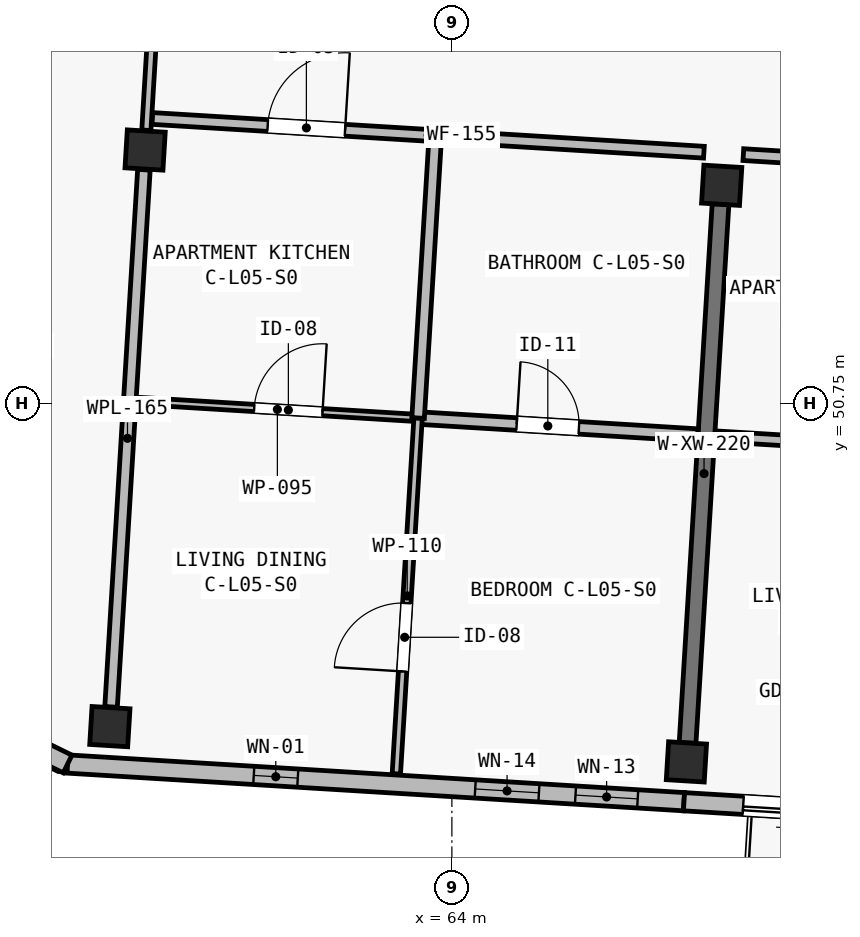
"""IFC4 building model, lengths in metres.
Left out: names, types, materials, properties, quantities, classifications, styles, units other than length and angle.
Written with IfcOpenShell. Run it as: python <this file> out.ifc"""

import sys

from ifc_helpers import new_model, si_unit, direction, frame, frame_2d, origin, origin_2d, place, context, subcontext, project, spatial, rectangle, extrude, element, fill, save


model = new_model("IFC4")
c1 = context("Model", 3, precision=1e-05, world=origin(), true_north=direction((0.0, 1.0)))
c2 = subcontext(c1, "Body", "Model", "MODEL_VIEW")
j1 = project(units=[si_unit("LENGTHUNIT", "METRE"), si_unit("PLANEANGLEUNIT", "RADIAN")], contexts=[c1])
p1 = place(None, origin())
s1 = spatial("IfcSite", under=j1, at=p1, CompositionType="ELEMENT")
p2 = place(p1, origin())
s2 = spatial("IfcBuilding", under=s1, at=p2, CompositionType="ELEMENT")
p3 = place(p2, frame((0.0, 0.0, 18.15)))
s3 = spatial("IfcBuildingStorey", under=s2, at=p3, CompositionType="ELEMENT", Elevation=18.15)
for number, where, z_axis, x_axis in (
    (1, (59.5, 46.5, 0.0), (0.0, 0.0, 1.0), (0.998, -0.061, 0.0)),
    (2, (59.964, 54.086, 0.0), (0.0, 0.0, 1.0), (0.998, -0.061, 0.0)),
    (3, (67.086, 46.036, 0.0), (0.0, 0.0, 1.0), (0.998, -0.061, 0.0)),
    (4, (67.55, 53.622, 0.0), (0.0, 0.0, 1.0), (0.998, -0.061, 0.0)),
):
    element("IfcColumn", number, at=place(p3, frame(where, z_axis=z_axis, x_axis=x_axis)), inside=s3, PredefinedType="COLUMN", context=c2, shape_type="SweptSolid", body=[
        extrude(rectangle(XDim=0.5, YDim=0.5, at=origin_2d()), origin(), (0.0, 0.0, 1.0), 3.25),
    ])
p4 = place(p3, frame((67.101, 46.286, 0.0), z_axis=(0.0, 0.0, 1.0), x_axis=(0.061035953884, 0.998135568114, 0.0)))
e5 = element("IfcWall", 5, at=p4, inside=s3, PredefinedType="SHEAR", context=c2, shape_type="SweptSolid", body=[
    extrude(rectangle(XDim=7.1, YDim=0.22, at=frame_2d((3.55, 0.0))), origin(), (0.0, 0.0, 1.0), 2.5),
])
p5 = place(p3, frame((67.054, 45.512, 0.0), z_axis=(0.0, 0.0, 1.0), x_axis=(-0.998134248939, 0.061057522844, 0.0)))
e6 = element("IfcWall", 6, at=p5, inside=s3, PredefinedType="SOLIDWALL", context=c2, shape_type="SweptSolid", body=[
    extrude(rectangle(XDim=8.125, YDim=0.24, at=frame_2d((4.062, 0.0))), origin(), (0.0, 0.0, 1.0), 3.0),
])
p6 = place(p5, frame((0.61, 0.0, 0.52)))
e7 = element("IfcOpeningElement", 7, at=p6, cuts=e6, PredefinedType="OPENING", context=c2, shape_type="SweptSolid", body=[
    extrude(rectangle(XDim=0.82, YDim=2.18, at=frame_2d((0.41, 1.09))), frame((0.0, 0.135, 0.0), z_axis=(0.0, -1.0, 0.0), x_axis=(1.0, 0.0, 0.0)), (0.0, 0.0, 1.0), 0.27),
])
p7 = place(p5, frame((1.912, 0.0, 0.42)))
e8 = element("IfcOpeningElement", 8, at=p7, cuts=e6, PredefinedType="OPENING", context=c2, shape_type="SweptSolid", body=[
    extrude(rectangle(XDim=0.84, YDim=2.28, at=frame_2d((0.42, 1.14))), frame((0.0, 0.135, 0.0), z_axis=(0.0, -1.0, 0.0), x_axis=(1.0, 0.0, 0.0)), (0.0, 0.0, 1.0), 0.27),
])
p8 = place(p5, frame((5.091, 0.0, 0.52)))
e9 = element("IfcOpeningElement", 9, at=p8, cuts=e6, PredefinedType="OPENING", context=c2, shape_type="SweptSolid", body=[
    extrude(rectangle(XDim=0.58, YDim=2.16, at=frame_2d((0.29, 1.08))), frame((0.0, 0.135, 0.0), z_axis=(0.0, -1.0, 0.0), x_axis=(1.0, 0.0, 0.0)), (0.0, 0.0, 1.0), 0.27),
])
p9 = place(p3, frame((74.64, 45.048, 0.0), z_axis=(0.0, 0.0, 1.0), x_axis=(-0.998135669243, 0.061034300063, 0.0)))
e10 = element("IfcWall", 10, at=p9, inside=s3, PredefinedType="SOLIDWALL", context=c2, shape_type="SweptSolid", body=[
    extrude(rectangle(XDim=7.6, YDim=0.24, at=frame_2d((3.8, 0.0))), origin(), (0.0, 0.0, 1.0), 3.0),
])
p10 = place(p9, frame((5.019, 0.0, 0.0)))
e11 = element("IfcOpeningElement", 11, at=p10, cuts=e10, PredefinedType="OPENING", context=c2, shape_type="SweptSolid", body=[
    extrude(rectangle(XDim=1.8, YDim=2.12, at=frame_2d((0.9, 1.06))), frame((0.0, 0.135, 0.0), z_axis=(0.0, -1.0, 0.0), x_axis=(1.0, 0.0, 0.0)), (0.0, 0.0, 1.0), 0.27),
])
p11 = place(p9, frame((0.73, 0.0, 0.42)))
e12 = element("IfcOpeningElement", 12, at=p11, cuts=e10, PredefinedType="OPENING", context=c2, shape_type="SweptSolid", body=[
    extrude(rectangle(XDim=0.68, YDim=2.24, at=frame_2d((0.34, 1.12))), frame((0.0, 0.135, 0.0), z_axis=(0.0, -1.0, 0.0), x_axis=(1.0, 0.0, 0.0)), (0.0, 0.0, 1.0), 0.27),
])
p12 = place(p3, frame((58.944, 46.008, 0.0), z_axis=(0.0, 0.0, 1.0), x_axis=(-0.897775054318, 0.440454256246, 0.0)))
e13 = element("IfcWall", 13, at=p12, inside=s3, PredefinedType="SOLIDWALL", context=c2, shape_type="SweptSolid", body=[
    extrude(rectangle(XDim=8.12, YDim=0.26, at=frame_2d((4.06, 0.0))), origin(), (0.0, 0.0, 1.0), 3.0),
])
p13 = place(p12, frame((2.63, 0.0, 0.52)))
e14 = element("IfcOpeningElement", 14, at=p13, cuts=e13, PredefinedType="OPENING", context=c2, shape_type="SweptSolid", body=[
    extrude(rectangle(XDim=0.82, YDim=2.18, at=frame_2d((0.41, 1.09))), frame((0.0, 0.145, 0.0), z_axis=(0.0, -1.0, 0.0), x_axis=(1.0, 0.0, 0.0)), (0.0, 0.0, 1.0), 0.29),
])
p14 = place(p12, frame((4.47, 0.0, 0.45)))
e15 = element("IfcOpeningElement", 15, at=p14, cuts=e13, PredefinedType="OPENING", context=c2, shape_type="SweptSolid", body=[
    extrude(rectangle(XDim=0.66, YDim=2.32, at=frame_2d((0.33, 1.16))), frame((0.0, 0.145, 0.0), z_axis=(0.0, -1.0, 0.0), x_axis=(1.0, 0.0, 0.0)), (0.0, 0.0, 1.0), 0.29),
])
p15 = place(p3, frame((51.654, 49.585, 0.0), z_axis=(0.0, 0.0, 1.0), x_axis=(0.448621989068, 0.893721607059, 0.0)))
e16 = element("IfcWall", 16, at=p15, inside=s3, PredefinedType="SOLIDWALL", context=c2, shape_type="SweptSolid", body=[
    extrude(rectangle(XDim=19.061, YDim=0.26, at=frame_2d((9.53, 0.0))), origin(), (0.0, 0.0, 1.0), 3.0),
])
p16 = place(p15, frame((2.63, 0.0, 0.52)))
e17 = element("IfcOpeningElement", 17, at=p16, cuts=e16, PredefinedType="OPENING", context=c2, shape_type="SweptSolid", body=[
    extrude(rectangle(XDim=0.82, YDim=2.18, at=frame_2d((0.41, 1.09))), frame((0.0, 0.145, 0.0), z_axis=(0.0, -1.0, 0.0), x_axis=(1.0, 0.0, 0.0)), (0.0, 0.0, 1.0), 0.29),
])
p17 = place(p15, frame((15.41, 0.0, 0.45)))
e18 = element("IfcOpeningElement", 18, at=p17, cuts=e16, PredefinedType="OPENING", context=c2, shape_type="SweptSolid", body=[
    extrude(rectangle(XDim=0.66, YDim=2.32, at=frame_2d((0.33, 1.16))), frame((0.0, 0.145, 0.0), z_axis=(0.0, -1.0, 0.0), x_axis=(1.0, 0.0, 0.0)), (0.0, 0.0, 1.0), 0.29),
])
p18 = place(p3, frame((59.98, 54.345, 0.0), z_axis=(0.0, 0.0, 1.0), x_axis=(0.061101107425, 0.998131581843, 0.0)))
e19 = element("IfcWall", 19, at=p18, inside=s3, PredefinedType="PARTITIONING", context=c2, shape_type="SweptSolid", body=[
    extrude(rectangle(XDim=3.88, YDim=0.12, at=frame_2d((1.94, 0.0))), origin(), (0.0, 0.0, 1.0), 2.5),
])
p19 = place(p18, frame((1.35, 0.0, 0.0)))
e20 = element("IfcOpeningElement", 20, at=p19, cuts=e19, PredefinedType="OPENING", context=c2, shape_type="SweptSolid", body=[
    extrude(rectangle(XDim=0.9, YDim=2.1, at=frame_2d((0.45, 1.05))), frame((0.0, 0.075, 0.0), z_axis=(0.0, -1.0, 0.0), x_axis=(1.0, 0.0, 0.0)), (0.0, 0.0, 1.0), 0.15),
])
p20 = place(p3, frame((59.516, 46.76, 0.0), z_axis=(0.0, 0.0, 1.0), x_axis=(0.061034344288, 0.998135666539, 0.0)))
e21 = element("IfcWall", 21, at=p20, inside=s3, PredefinedType="PLUMBINGWALL", context=c2, shape_type="SweptSolid", body=[
    extrude(rectangle(XDim=7.08, YDim=0.165, at=frame_2d((3.54, 0.0))), origin(), (0.0, 0.0, 1.0), 2.5),
])
p21 = place(p3, frame((60.06, 54.501, 0.0), z_axis=(0.0, 0.0, 1.0), x_axis=(0.998134543433, -0.06105270843, 0.0)))
e22 = element("IfcWall", 22, at=p21, inside=s3, PredefinedType="PARTITIONING", context=c2, shape_type="SweptSolid", body=[
    extrude(rectangle(XDim=7.27, YDim=0.155, at=frame_2d((3.635, 0.0))), origin(), (0.0, 0.0, 1.0), 2.97),
])
p22 = place(p21, frame((1.52, 0.0, 0.0)))
e23 = element("IfcOpeningElement", 23, at=p22, cuts=e22, PredefinedType="OPENING", context=c2, shape_type="SweptSolid", body=[
    extrude(rectangle(XDim=1.02, YDim=2.2, at=frame_2d((0.51, 1.1))), frame((0.0, 0.093, 0.0), z_axis=(0.0, -1.0, 0.0), x_axis=(1.0, 0.0, 0.0)), (0.0, 0.0, 1.0), 0.185),
])
p23 = place(p3, frame((59.852, 50.786, 0.0), z_axis=(0.0, 0.0, 1.0), x_axis=(0.998137662841, -0.061001688651, 0.0)))
e24 = element("IfcWall", 24, at=p23, inside=s3, PredefinedType="PARTITIONING", context=c2, shape_type="SweptSolid", body=[
    extrude(rectangle(XDim=3.71, YDim=0.095, at=frame_2d((1.855, 0.0))), origin(), (0.0, 0.0, 1.0), 2.97),
])
p24 = place(p23, frame((1.55, 0.0, 0.0)))
e25 = element("IfcOpeningElement", 25, at=p24, cuts=e24, PredefinedType="OPENING", context=c2, shape_type="SweptSolid", body=[
    extrude(rectangle(XDim=0.9, YDim=2.1, at=frame_2d((0.45, 1.05))), frame((0.0, 0.062, 0.0), z_axis=(0.0, -1.0, 0.0), x_axis=(1.0, 0.0, 0.0)), (0.0, 0.0, 1.0), 0.125),
])
p25 = place(p3, frame((63.555, 50.56, 0.0), z_axis=(0.0, 0.0, 1.0), x_axis=(0.998132682596, -0.061083123148, 0.0)))
e26 = element("IfcWall", 26, at=p25, inside=s3, PredefinedType="PLUMBINGWALL", context=c2, shape_type="SweptSolid", body=[
    extrude(rectangle(XDim=3.685, YDim=0.165, at=frame_2d((1.843, 0.0))), origin(), (0.0, 0.0, 1.0), 2.97),
])
p26 = place(p25, frame((1.3, 0.0, 0.0)))
e27 = element("IfcOpeningElement", 27, at=p26, cuts=e26, PredefinedType="OPENING", context=c2, shape_type="SweptSolid", body=[
    extrude(rectangle(XDim=0.82, YDim=2.08, at=frame_2d((0.41, 1.04))), frame((0.0, 0.097, 0.0), z_axis=(0.0, -1.0, 0.0), x_axis=(1.0, 0.0, 0.0)), (0.0, 0.0, 1.0), 0.195),
])
p27 = place(p3, frame((63.269, 45.879, 0.0), z_axis=(0.0, 0.0, 1.0), x_axis=(0.061059262019, 0.998134142549, 0.0)))
e28 = element("IfcWall", 28, at=p27, inside=s3, PredefinedType="PARTITIONING", context=c2, shape_type="SweptSolid", body=[
    extrude(rectangle(XDim=4.69, YDim=0.11, at=frame_2d((2.345, 0.0))), origin(), (0.0, 0.0, 1.0), 2.97),
])
p28 = place(p27, frame((1.35, 0.0, 0.0)))
e29 = element("IfcOpeningElement", 29, at=p28, cuts=e28, PredefinedType="OPENING", context=c2, shape_type="SweptSolid", body=[
    extrude(rectangle(XDim=0.9, YDim=2.1, at=frame_2d((0.45, 1.05))), frame((0.0, 0.07, 0.0), z_axis=(0.0, -1.0, 0.0), x_axis=(1.0, 0.0, 0.0)), (0.0, 0.0, 1.0), 0.14),
])
p29 = place(p3, frame((63.555, 50.56, 0.0), z_axis=(0.0, 0.0, 1.0), x_axis=(0.061038003798, 0.998135442759, 0.0)))
e30 = element("IfcWall", 30, at=p29, inside=s3, PredefinedType="PLUMBINGWALL", context=c2, shape_type="SweptSolid", body=[
    extrude(rectangle(XDim=3.72, YDim=0.165, at=frame_2d((1.86, 0.0))), origin(), (0.0, 0.0, 1.0), 2.97),
])
p30 = place(p3, frame((67.835, 54.025, 0.0), z_axis=(0.0, 0.0, 1.0), x_axis=(0.998135666539, -0.061034344288, 0.0)))
e31 = element("IfcWall", 31, at=p30, inside=s3, PredefinedType="PARTITIONING", context=c2, shape_type="SweptSolid", body=[
    extrude(rectangle(XDim=7.08, YDim=0.155, at=frame_2d((3.54, 0.0))), origin(), (0.0, 0.0, 1.0), 2.97),
])
p31 = place(p30, frame((1.33, 0.0, 0.0)))
e32 = element("IfcOpeningElement", 32, at=p31, cuts=e31, PredefinedType="OPENING", context=c2, shape_type="SweptSolid", body=[
    extrude(rectangle(XDim=0.98, YDim=2.15, at=frame_2d((0.49, 1.075))), frame((0.0, 0.093, 0.0), z_axis=(0.0, -1.0, 0.0), x_axis=(1.0, 0.0, 0.0)), (0.0, 0.0, 1.0), 0.185),
])
p32 = place(p3, frame((67.463, 50.321, 0.0), z_axis=(0.0, 0.0, 1.0), x_axis=(0.998132682596, -0.061083123148, 0.0)))
e33 = element("IfcWall", 33, at=p32, inside=s3, PredefinedType="PARTITIONING", context=c2, shape_type="SweptSolid", body=[
    extrude(rectangle(XDim=3.685, YDim=0.14, at=frame_2d((1.843, 0.0))), origin(), (0.0, 0.0, 1.0), 2.97),
])
p33 = place(p32, frame((1.525, 0.0, 0.0)))
e34 = element("IfcOpeningElement", 34, at=p33, cuts=e33, PredefinedType="OPENING", context=c2, shape_type="SweptSolid", body=[
    extrude(rectangle(XDim=0.9, YDim=2.1, at=frame_2d((0.45, 1.05))), frame((0.0, 0.085, 0.0), z_axis=(0.0, -1.0, 0.0), x_axis=(1.0, 0.0, 0.0)), (0.0, 0.0, 1.0), 0.17),
])
p34 = place(p6, origin())
e35 = element("IfcWindow", 35, at=p34, inside=s3, PartitioningType="SINGLE_PANEL", PredefinedType="WINDOW", context=c2, shape_type="SweptSolid", body=[
    extrude(rectangle(XDim=0.82, YDim=2.18, at=frame_2d((0.41, 1.09))), frame((0.0, 0.03, 0.0), z_axis=(0.0, -1.0, 0.0), x_axis=(1.0, 0.0, 0.0)), (0.0, 0.0, 1.0), 0.06),
])
fill(e7, e35)
p35 = place(p7, origin())
e36 = element("IfcWindow", 36, at=p35, inside=s3, PartitioningType="SINGLE_PANEL", PredefinedType="WINDOW", context=c2, shape_type="SweptSolid", body=[
    extrude(rectangle(XDim=0.84, YDim=2.28, at=frame_2d((0.42, 1.14))), frame((0.0, 0.03, 0.0), z_axis=(0.0, -1.0, 0.0), x_axis=(1.0, 0.0, 0.0)), (0.0, 0.0, 1.0), 0.06),
])
fill(e8, e36)
p36 = place(p8, origin())
e37 = element("IfcWindow", 37, at=p36, inside=s3, PartitioningType="SINGLE_PANEL", PredefinedType="WINDOW", context=c2, shape_type="SweptSolid", body=[
    extrude(rectangle(XDim=0.58, YDim=2.16, at=frame_2d((0.29, 1.08))), frame((0.0, 0.03, 0.0), z_axis=(0.0, -1.0, 0.0), x_axis=(1.0, 0.0, 0.0)), (0.0, 0.0, 1.0), 0.06),
])
fill(e9, e37)
p37 = place(p10, origin())
e38 = element("IfcDoor", 38, at=p37, inside=s3, OperationType="SLIDING_TO_LEFT", PredefinedType="DOOR", context=c2, shape_type="SweptSolid", body=[
    extrude(rectangle(XDim=1.8, YDim=2.12, at=frame_2d((0.9, 1.06))), frame((0.0, 0.025, 0.0), z_axis=(0.0, -1.0, 0.0), x_axis=(1.0, 0.0, 0.0)), (0.0, 0.0, 1.0), 0.05),
])
fill(e11, e38)
p38 = place(p22, origin())
e39 = element("IfcDoor", 39, at=p38, inside=s3, OperationType="SINGLE_SWING_RIGHT", PredefinedType="DOOR", context=c2, shape_type="SweptSolid", body=[
    extrude(rectangle(XDim=1.02, YDim=2.2, at=frame_2d((0.51, 1.1))), frame((0.0, 0.025, 0.0), z_axis=(0.0, -1.0, 0.0), x_axis=(1.0, 0.0, 0.0)), (0.0, 0.0, 1.0), 0.05),
])
fill(e23, e39)
p39 = place(p24, origin())
e40 = element("IfcDoor", 40, at=p39, inside=s3, OperationType="SINGLE_SWING_RIGHT", PredefinedType="DOOR", context=c2, shape_type="SweptSolid", body=[
    extrude(rectangle(XDim=0.9, YDim=2.1, at=frame_2d((0.45, 1.05))), frame((0.0, 0.025, 0.0), z_axis=(0.0, -1.0, 0.0), x_axis=(1.0, 0.0, 0.0)), (0.0, 0.0, 1.0), 0.05),
])
fill(e25, e40)
p40 = place(p26, origin())
e41 = element("IfcDoor", 41, at=p40, inside=s3, OperationType="SINGLE_SWING_LEFT", PredefinedType="DOOR", context=c2, shape_type="SweptSolid", body=[
    extrude(rectangle(XDim=0.82, YDim=2.08, at=frame_2d((0.41, 1.04))), frame((0.0, 0.025, 0.0), z_axis=(0.0, -1.0, 0.0), x_axis=(1.0, 0.0, 0.0)), (0.0, 0.0, 1.0), 0.05),
])
fill(e27, e41)
p41 = place(p28, origin())
e42 = element("IfcDoor", 42, at=p41, inside=s3, OperationType="SINGLE_SWING_LEFT", PredefinedType="DOOR", context=c2, shape_type="SweptSolid", body=[
    extrude(rectangle(XDim=0.9, YDim=2.1, at=frame_2d((0.45, 1.05))), frame((0.0, 0.025, 0.0), z_axis=(0.0, -1.0, 0.0), x_axis=(1.0, 0.0, 0.0)), (0.0, 0.0, 1.0), 0.05),
])
fill(e29, e42)
save(model, sys.argv[1])
